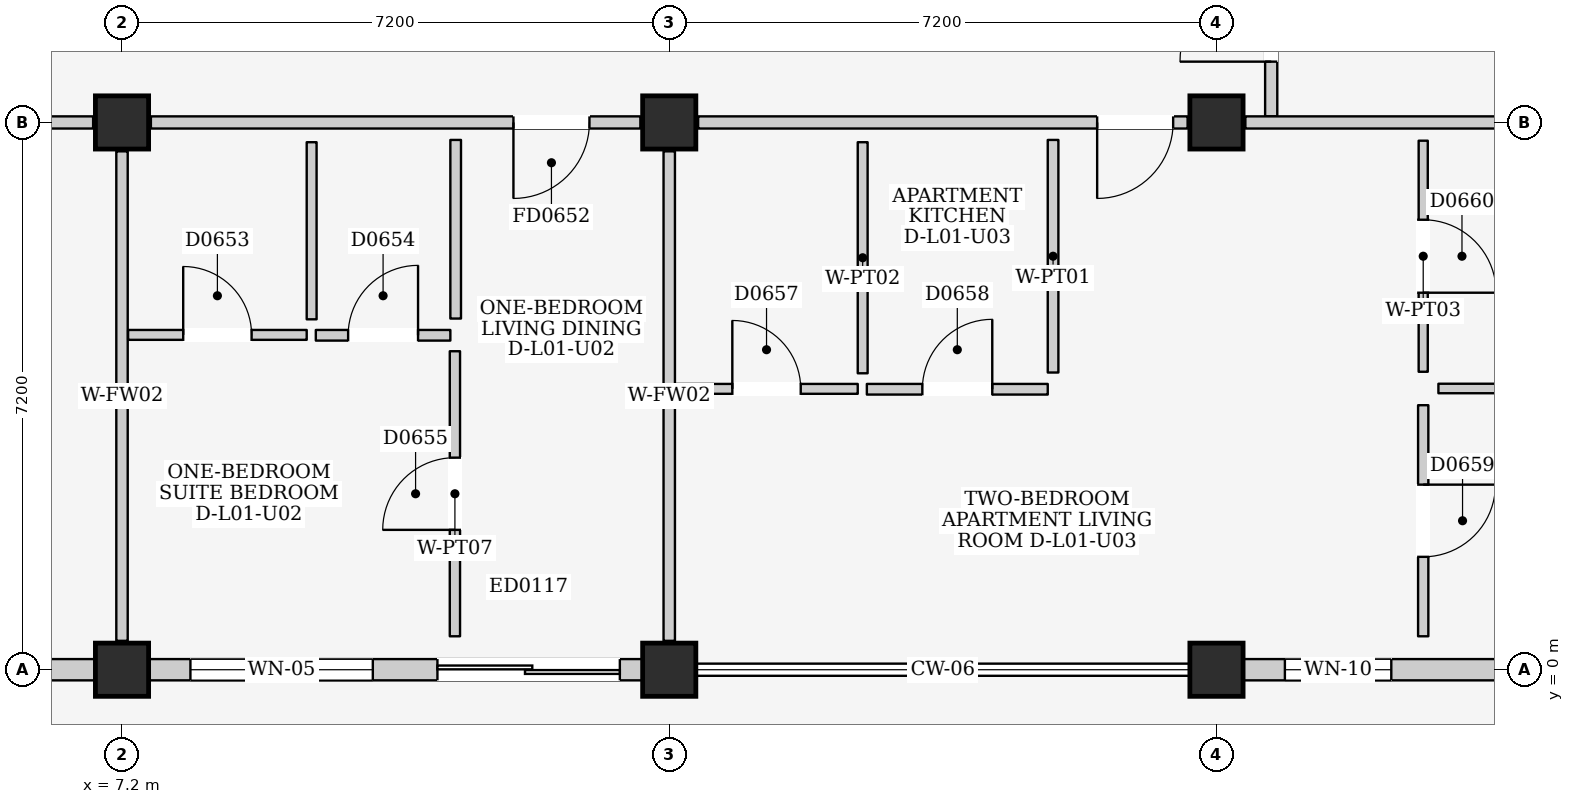
"""IFC4 building model, lengths in metres.
Left out: names, types, materials, properties, quantities, classifications, styles, units other than length and angle.
Written with IfcOpenShell. Run it as: python <this file> out.ifc"""

import sys

from ifc_helpers import new_model, si_unit, direction, frame, frame_2d, origin, origin_2d, place, context, subcontext, project, spatial, rectangle, extrude, element, fill, save


model = new_model("IFC4")
c1 = context("Model", 3, precision=1e-05, world=origin(), true_north=direction((0.0, 1.0)))
c2 = subcontext(c1, "Body", "Model", "MODEL_VIEW")
j1 = project(units=[si_unit("LENGTHUNIT", "METRE"), si_unit("PLANEANGLEUNIT", "RADIAN")], contexts=[c1])
p1 = place(None, origin())
s1 = spatial("IfcSite", under=j1, at=p1, CompositionType="ELEMENT")
p2 = place(p1, origin())
s2 = spatial("IfcBuilding", under=s1, at=p2, CompositionType="ELEMENT")
p3 = place(p2, frame((0.0, 0.0, 4.5)))
s3 = spatial("IfcBuildingStorey", under=s2, at=p3, CompositionType="ELEMENT", Elevation=4.5)
for number, where, z_axis, x_axis in (
    (1, (7.2, 0.0, 0.0), (0.0, 0.0, 1.0), (1.0, 0.0, 0.0)),
    (2, (7.2, 7.2, 0.0), (0.0, 0.0, 1.0), (1.0, 0.0, 0.0)),
    (3, (14.4, 0.0, 0.0), (0.0, 0.0, 1.0), (1.0, 0.0, 0.0)),
    (4, (14.4, 7.2, 0.0), (0.0, 0.0, 1.0), (1.0, 0.0, 0.0)),
    (5, (21.6, 0.0, 0.0), (0.0, 0.0, 1.0), (1.0, 0.0, 0.0)),
    (6, (21.6, 7.2, 0.0), (0.0, 0.0, 1.0), (1.0, 0.0, 0.0)),
):
    element("IfcColumn", number, at=place(p3, frame(where, z_axis=z_axis, x_axis=x_axis)), inside=s3, PredefinedType="COLUMN", context=c2, shape_type="SweptSolid", body=[
        extrude(rectangle(XDim=0.7, YDim=0.7, at=origin_2d()), origin(), (0.0, 0.0, 1.0), 4.5),
    ])
p4 = place(p3, frame((0.35, 0.0, 0.0), z_axis=(0.0, 0.0, 1.0), x_axis=(1.0, 0.0, 0.0)))
e7 = element("IfcWall", 7, at=p4, inside=s3, PredefinedType="ELEMENTEDWALL", context=c2, shape_type="SweptSolid", body=[
    extrude(rectangle(XDim=6.5, YDim=0.28, at=frame_2d((3.25, 0.0))), origin(), (0.0, 0.0, 1.0), 3.715),
])
p5 = place(p4, frame((3.85, 0.0, 0.0)))
e8 = element("IfcOpeningElement", 8, at=p5, cuts=e7, PredefinedType="OPENING", context=c2, shape_type="SweptSolid", body=[
    extrude(rectangle(XDim=1.5, YDim=2.12, at=frame_2d((0.75, 1.06))), frame((0.0, 0.155, 0.0), z_axis=(0.0, -1.0, 0.0), x_axis=(1.0, 0.0, 0.0)), (0.0, 0.0, 1.0), 0.31),
])
p6 = place(p4, frame((0.55, 0.0, 0.9)))
e9 = element("IfcOpeningElement", 9, at=p6, cuts=e7, PredefinedType="OPENING", context=c2, shape_type="SweptSolid", body=[
    extrude(rectangle(XDim=0.9, YDim=1.1, at=frame_2d((0.45, 0.55))), frame((0.0, 0.155, 0.0), z_axis=(0.0, -1.0, 0.0), x_axis=(1.0, 0.0, 0.0)), (0.0, 0.0, 1.0), 0.31),
])
p7 = place(p3, frame((7.55, 0.0, 0.0), z_axis=(0.0, 0.0, 1.0), x_axis=(1.0, 0.0, 0.0)))
e10 = element("IfcWall", 10, at=p7, inside=s3, PredefinedType="ELEMENTEDWALL", context=c2, shape_type="SweptSolid", body=[
    extrude(rectangle(XDim=6.5, YDim=0.28, at=frame_2d((3.25, 0.0))), origin(), (0.0, 0.0, 1.0), 3.715),
])
p8 = place(p7, frame((3.8, 0.0, 0.0)))
e11 = element("IfcOpeningElement", 11, at=p8, cuts=e10, PredefinedType="OPENING", context=c2, shape_type="SweptSolid", body=[
    extrude(rectangle(XDim=2.4, YDim=2.12, at=frame_2d((1.2, 1.06))), frame((0.0, 0.155, 0.0), z_axis=(0.0, -1.0, 0.0), x_axis=(1.0, 0.0, 0.0)), (0.0, 0.0, 1.0), 0.31),
])
p9 = place(p7, frame((0.55, 0.0, 0.9)))
e12 = element("IfcOpeningElement", 12, at=p9, cuts=e10, PredefinedType="OPENING", context=c2, shape_type="SweptSolid", body=[
    extrude(rectangle(XDim=2.4, YDim=1.65, at=frame_2d((1.2, 0.825))), frame((0.0, 0.155, 0.0), z_axis=(0.0, -1.0, 0.0), x_axis=(1.0, 0.0, 0.0)), (0.0, 0.0, 1.0), 0.31),
])
p10 = place(p3, frame((21.95, 0.0, 0.0), z_axis=(0.0, 0.0, 1.0), x_axis=(1.0, 0.0, 0.0)))
e13 = element("IfcWall", 13, at=p10, inside=s3, PredefinedType="ELEMENTEDWALL", context=c2, shape_type="SweptSolid", body=[
    extrude(rectangle(XDim=6.5, YDim=0.28, at=frame_2d((3.25, 0.0))), origin(), (0.0, 0.0, 1.0), 3.715),
])
p11 = place(p10, frame((3.85, 0.0, 0.0)))
e14 = element("IfcOpeningElement", 14, at=p11, cuts=e13, PredefinedType="OPENING", context=c2, shape_type="SweptSolid", body=[
    extrude(rectangle(XDim=1.4, YDim=2.1, at=frame_2d((0.7, 1.05))), frame((0.0, 0.155, 0.0), z_axis=(0.0, -1.0, 0.0), x_axis=(1.0, 0.0, 0.0)), (0.0, 0.0, 1.0), 0.31),
])
p12 = place(p10, frame((0.55, 0.0, 0.9)))
e15 = element("IfcOpeningElement", 15, at=p12, cuts=e13, PredefinedType="OPENING", context=c2, shape_type="SweptSolid", body=[
    extrude(rectangle(XDim=1.4, YDim=1.2, at=frame_2d((0.7, 0.6))), frame((0.0, 0.155, 0.0), z_axis=(0.0, -1.0, 0.0), x_axis=(1.0, 0.0, 0.0)), (0.0, 0.0, 1.0), 0.31),
])
p13 = place(p3, frame((22.32, 7.28, 0.0), z_axis=(0.0, 0.0, 1.0), x_axis=(0.0, 1.0, 0.0)))
e16 = element("IfcWall", 16, at=p13, inside=s3, PredefinedType="PARTITIONING", context=c2, shape_type="SweptSolid", body=[
    extrude(rectangle(XDim=4.32, YDim=0.16, at=frame_2d((2.16, 0.0))), origin(), (0.0, 0.0, 1.0), 4.25),
])
p14 = place(p13, frame((0.72, 0.0, 0.0)))
e17 = element("IfcOpeningElement", 17, at=p14, cuts=e16, PredefinedType="OPENING", context=c2, shape_type="SweptSolid", body=[
    extrude(rectangle(XDim=1.2, YDim=2.2, at=frame_2d((0.6, 1.1))), frame((0.0, 0.095, 0.0), z_axis=(0.0, -1.0, 0.0), x_axis=(1.0, 0.0, 0.0)), (0.0, 0.0, 1.0), 0.19),
])
p15 = place(p3, frame((0.38, 7.2, 0.0), z_axis=(0.0, 0.0, 1.0), x_axis=(1.0, 0.0, 0.0)))
e18 = element("IfcWall", 18, at=p15, inside=s3, PredefinedType="PARTITIONING", context=c2, shape_type="SweptSolid", body=[
    extrude(rectangle(XDim=6.44, YDim=0.16, at=frame_2d((3.22, 0.0))), origin(), (0.0, 0.0, 1.0), 3.635),
])
p16 = place(p15, frame((4.045, 0.0, 0.0)))
e19 = element("IfcOpeningElement", 19, at=p16, cuts=e18, PredefinedType="OPENING", context=c2, shape_type="SweptSolid", body=[
    extrude(rectangle(XDim=1.05, YDim=2.2, at=frame_2d((0.525, 1.1))), frame((0.0, 0.095, 0.0), z_axis=(0.0, -1.0, 0.0), x_axis=(1.0, 0.0, 0.0)), (0.0, 0.0, 1.0), 0.19),
])
p17 = place(p3, frame((7.2, 0.38, 0.0), z_axis=(0.0, 0.0, 1.0), x_axis=(0.0, 1.0, 0.0)))
e20 = element("IfcWall", 20, at=p17, inside=s3, PredefinedType="PARTITIONING", context=c2, shape_type="SweptSolid", body=[
    extrude(rectangle(XDim=6.44, YDim=0.15, at=frame_2d((3.22, 0.0))), origin(), (0.0, 0.0, 1.0), 3.685),
])
p18 = place(p3, frame((7.58, 7.2, 0.0), z_axis=(0.0, 0.0, 1.0), x_axis=(1.0, 0.0, 0.0)))
e21 = element("IfcWall", 21, at=p18, inside=s3, PredefinedType="PARTITIONING", context=c2, shape_type="SweptSolid", body=[
    extrude(rectangle(XDim=6.44, YDim=0.16, at=frame_2d((3.22, 0.0))), origin(), (0.0, 0.0, 1.0), 3.635),
])
p19 = place(p18, frame((4.77, 0.0, 0.0)))
e22 = element("IfcOpeningElement", 22, at=p19, cuts=e21, PredefinedType="OPENING", context=c2, shape_type="SweptSolid", body=[
    extrude(rectangle(XDim=1.0, YDim=2.15, at=frame_2d((0.5, 1.075))), frame((0.0, 0.095, 0.0), z_axis=(0.0, -1.0, 0.0), x_axis=(1.0, 0.0, 0.0)), (0.0, 0.0, 1.0), 0.19),
])
p20 = place(p3, frame((14.4, 0.38, 0.0), z_axis=(0.0, 0.0, 1.0), x_axis=(0.0, 1.0, 0.0)))
e23 = element("IfcWall", 23, at=p20, inside=s3, PredefinedType="PARTITIONING", context=c2, shape_type="SweptSolid", body=[
    extrude(rectangle(XDim=6.44, YDim=0.15, at=frame_2d((3.22, 0.0))), origin(), (0.0, 0.0, 1.0), 3.685),
])
p21 = place(p3, frame((7.28, 4.405, 0.0), z_axis=(0.0, 0.0, 1.0), x_axis=(1.0, 0.0, 0.0)))
e24 = element("IfcWall", 24, at=p21, inside=s3, PredefinedType="PARTITIONING", context=c2, shape_type="SweptSolid", body=[
    extrude(rectangle(XDim=2.35, YDim=0.13, at=frame_2d((1.175, 0.0))), origin(), (0.0, 0.0, 1.0), 4.25),
])
p22 = place(p21, frame((0.725, 0.0, 0.0)))
e25 = element("IfcOpeningElement", 25, at=p22, cuts=e24, PredefinedType="OPENING", context=c2, shape_type="SweptSolid", body=[
    extrude(rectangle(XDim=0.9, YDim=2.1, at=frame_2d((0.45, 1.05))), frame((0.0, 0.08, 0.0), z_axis=(0.0, -1.0, 0.0), x_axis=(1.0, 0.0, 0.0)), (0.0, 0.0, 1.0), 0.16),
])
p23 = place(p3, frame((9.695, 4.61, 0.0), z_axis=(0.0, 0.0, 1.0), x_axis=(0.0, 1.0, 0.0)))
e26 = element("IfcWall", 26, at=p23, inside=s3, PredefinedType="PARTITIONING", context=c2, shape_type="SweptSolid", body=[
    extrude(rectangle(XDim=2.33, YDim=0.13, at=frame_2d((1.165, 0.0))), origin(), (0.0, 0.0, 1.0), 4.25),
])
p24 = place(p3, frame((9.75, 4.4, 0.0), z_axis=(0.0, 0.0, 1.0), x_axis=(1.0, 0.0, 0.0)))
e27 = element("IfcWall", 27, at=p24, inside=s3, PredefinedType="PARTITIONING", context=c2, shape_type="SweptSolid", body=[
    extrude(rectangle(XDim=1.77, YDim=0.14, at=frame_2d((0.885, 0.0))), origin(), (0.0, 0.0, 1.0), 4.25),
])
p25 = place(p24, frame((0.425, 0.0, 0.0)))
e28 = element("IfcOpeningElement", 28, at=p25, cuts=e27, PredefinedType="OPENING", context=c2, shape_type="SweptSolid", body=[
    extrude(rectangle(XDim=0.92, YDim=2.1, at=frame_2d((0.46, 1.05))), frame((0.0, 0.085, 0.0), z_axis=(0.0, -1.0, 0.0), x_axis=(1.0, 0.0, 0.0)), (0.0, 0.0, 1.0), 0.17),
])
p26 = place(p3, frame((11.59, 4.62, 0.0), z_axis=(0.0, 0.0, 1.0), x_axis=(0.0, 1.0, 0.0)))
e29 = element("IfcWall", 29, at=p26, inside=s3, PredefinedType="PARTITIONING", context=c2, shape_type="SweptSolid", body=[
    extrude(rectangle(XDim=2.35, YDim=0.14, at=frame_2d((1.175, 0.0))), origin(), (0.0, 0.0, 1.0), 4.25),
])
p27 = place(p3, frame((11.58, 0.44, 0.0), z_axis=(0.0, 0.0, 1.0), x_axis=(0.0, 1.0, 0.0)))
e30 = element("IfcWall", 30, at=p27, inside=s3, PredefinedType="PARTITIONING", context=c2, shape_type="SweptSolid", body=[
    extrude(rectangle(XDim=3.75, YDim=0.135, at=frame_2d((1.875, 0.0))), origin(), (0.0, 0.0, 1.0), 4.25),
])
p28 = place(p27, frame((1.4, 0.0, 0.0)))
e31 = element("IfcOpeningElement", 31, at=p28, cuts=e30, PredefinedType="OPENING", context=c2, shape_type="SweptSolid", body=[
    extrude(rectangle(XDim=0.95, YDim=2.15, at=frame_2d((0.475, 1.075))), frame((0.0, 0.083, 0.0), z_axis=(0.0, -1.0, 0.0), x_axis=(1.0, 0.0, 0.0)), (0.0, 0.0, 1.0), 0.165),
])
p29 = place(p3, frame((14.78, 7.2, 0.0), z_axis=(0.0, 0.0, 1.0), x_axis=(1.0, 0.0, 0.0)))
e32 = element("IfcWall", 32, at=p29, inside=s3, PredefinedType="PARTITIONING", context=c2, shape_type="SweptSolid", body=[
    extrude(rectangle(XDim=6.44, YDim=0.16, at=frame_2d((3.22, 0.0))), origin(), (0.0, 0.0, 1.0), 3.635),
])
p30 = place(p29, frame((5.25, 0.0, 0.0)))
e33 = element("IfcOpeningElement", 33, at=p30, cuts=e32, PredefinedType="OPENING", context=c2, shape_type="SweptSolid", body=[
    extrude(rectangle(XDim=1.0, YDim=2.15, at=frame_2d((0.5, 1.075))), frame((0.0, 0.095, 0.0), z_axis=(0.0, -1.0, 0.0), x_axis=(1.0, 0.0, 0.0)), (0.0, 0.0, 1.0), 0.19),
])
p31 = place(p3, frame((21.98, 7.2, 0.0), z_axis=(0.0, 0.0, 1.0), x_axis=(1.0, 0.0, 0.0)))
e34 = element("IfcWall", 34, at=p31, inside=s3, PredefinedType="PARTITIONING", context=c2, shape_type="SweptSolid", body=[
    extrude(rectangle(XDim=6.44, YDim=0.16, at=frame_2d((3.22, 0.0))), origin(), (0.0, 0.0, 1.0), 3.635),
])
p32 = place(p3, frame((14.48, 3.695, 0.0), z_axis=(0.0, 0.0, 1.0), x_axis=(1.0, 0.0, 0.0)))
e35 = element("IfcWall", 35, at=p32, inside=s3, PredefinedType="PARTITIONING", context=c2, shape_type="SweptSolid", body=[
    extrude(rectangle(XDim=2.4, YDim=0.13, at=frame_2d((1.2, 0.0))), origin(), (0.0, 0.0, 1.0), 4.25),
])
p33 = place(p32, frame((0.75, 0.0, 0.0)))
e36 = element("IfcOpeningElement", 36, at=p33, cuts=e35, PredefinedType="OPENING", context=c2, shape_type="SweptSolid", body=[
    extrude(rectangle(XDim=0.9, YDim=2.1, at=frame_2d((0.45, 1.05))), frame((0.0, 0.08, 0.0), z_axis=(0.0, -1.0, 0.0), x_axis=(1.0, 0.0, 0.0)), (0.0, 0.0, 1.0), 0.16),
])
p34 = place(p3, frame((16.945, 3.9, 0.0), z_axis=(0.0, 0.0, 1.0), x_axis=(0.0, 1.0, 0.0)))
e37 = element("IfcWall", 37, at=p34, inside=s3, PredefinedType="PARTITIONING", context=c2, shape_type="SweptSolid", body=[
    extrude(rectangle(XDim=3.04, YDim=0.13, at=frame_2d((1.52, 0.0))), origin(), (0.0, 0.0, 1.0), 4.25),
])
p35 = place(p3, frame((17.0, 3.69, 0.0), z_axis=(0.0, 0.0, 1.0), x_axis=(1.0, 0.0, 0.0)))
e38 = element("IfcWall", 38, at=p35, inside=s3, PredefinedType="PARTITIONING", context=c2, shape_type="SweptSolid", body=[
    extrude(rectangle(XDim=2.38, YDim=0.14, at=frame_2d((1.19, 0.0))), origin(), (0.0, 0.0, 1.0), 4.25),
])
p36 = place(p35, frame((0.73, 0.0, 0.0)))
e39 = element("IfcOpeningElement", 39, at=p36, cuts=e38, PredefinedType="OPENING", context=c2, shape_type="SweptSolid", body=[
    extrude(rectangle(XDim=0.92, YDim=2.1, at=frame_2d((0.46, 1.05))), frame((0.0, 0.085, 0.0), z_axis=(0.0, -1.0, 0.0), x_axis=(1.0, 0.0, 0.0)), (0.0, 0.0, 1.0), 0.17),
])
p37 = place(p3, frame((19.45, 3.91, 0.0), z_axis=(0.0, 0.0, 1.0), x_axis=(0.0, 1.0, 0.0)))
e40 = element("IfcWall", 40, at=p37, inside=s3, PredefinedType="PARTITIONING", context=c2, shape_type="SweptSolid", body=[
    extrude(rectangle(XDim=3.06, YDim=0.14, at=frame_2d((1.53, 0.0))), origin(), (0.0, 0.0, 1.0), 4.25),
])
p38 = place(p3, frame((24.32, 0.44, 0.0), z_axis=(0.0, 0.0, 1.0), x_axis=(0.0, 1.0, 0.0)))
e41 = element("IfcWall", 41, at=p38, inside=s3, PredefinedType="PARTITIONING", context=c2, shape_type="SweptSolid", body=[
    extrude(rectangle(XDim=3.04, YDim=0.135, at=frame_2d((1.52, 0.0))), origin(), (0.0, 0.0, 1.0), 4.25),
])
p39 = place(p38, frame((1.045, 0.0, 0.0)))
e42 = element("IfcOpeningElement", 42, at=p39, cuts=e41, PredefinedType="OPENING", context=c2, shape_type="SweptSolid", body=[
    extrude(rectangle(XDim=0.95, YDim=2.15, at=frame_2d((0.475, 1.075))), frame((0.0, 0.083, 0.0), z_axis=(0.0, -1.0, 0.0), x_axis=(1.0, 0.0, 0.0)), (0.0, 0.0, 1.0), 0.165),
])
p40 = place(p3, frame((24.52, 3.7, 0.0), z_axis=(0.0, 0.0, 1.0), x_axis=(1.0, 0.0, 0.0)))
e43 = element("IfcWall", 43, at=p40, inside=s3, PredefinedType="PARTITIONING", context=c2, shape_type="SweptSolid", body=[
    extrude(rectangle(XDim=4.06, YDim=0.125, at=frame_2d((2.03, 0.0))), origin(), (0.0, 0.0, 1.0), 4.25),
])
p41 = place(p3, frame((24.32, 3.92, 0.0), z_axis=(0.0, 0.0, 1.0), x_axis=(0.0, 1.0, 0.0)))
e44 = element("IfcWall", 44, at=p41, inside=s3, PredefinedType="PARTITIONING", context=c2, shape_type="SweptSolid", body=[
    extrude(rectangle(XDim=3.04, YDim=0.12, at=frame_2d((1.52, 0.0))), origin(), (0.0, 0.0, 1.0), 4.25),
])
p42 = place(p41, frame((1.04, 0.0, 0.0)))
e45 = element("IfcOpeningElement", 45, at=p42, cuts=e44, PredefinedType="OPENING", context=c2, shape_type="SweptSolid", body=[
    extrude(rectangle(XDim=0.96, YDim=2.15, at=frame_2d((0.48, 1.075))), frame((0.0, 0.075, 0.0), z_axis=(0.0, -1.0, 0.0), x_axis=(1.0, 0.0, 0.0)), (0.0, 0.0, 1.0), 0.15),
])
p43 = place(p8, frame((2.4, 0.0, 0.0), z_axis=(0.0, 0.0, 1.0), x_axis=(-1.0, 0.0, 0.0)))
e46 = element("IfcDoor", 46, at=p43, inside=s3, OperationType="DOUBLE_DOOR_SLIDING", PredefinedType="DOOR", context=c2, shape_type="SweptSolid", body=[
    extrude(rectangle(XDim=2.4, YDim=2.12, at=frame_2d((1.2, 1.06))), frame((0.0, 0.025, 0.0), z_axis=(0.0, -1.0, 0.0), x_axis=(1.0, 0.0, 0.0)), (0.0, 0.0, 1.0), 0.05),
])
fill(e11, e46)
p44 = place(p9, origin())
e47 = element("IfcWindow", 47, at=p44, inside=s3, PartitioningType="TRIPLE_PANEL_VERTICAL", PredefinedType="WINDOW", context=c2, shape_type="SweptSolid", body=[
    extrude(rectangle(XDim=2.4, YDim=1.65, at=frame_2d((1.2, 0.825))), frame((0.0, 0.03, 0.0), z_axis=(0.0, -1.0, 0.0), x_axis=(1.0, 0.0, 0.0)), (0.0, 0.0, 1.0), 0.06),
])
fill(e12, e47)
p45 = place(p12, origin())
e48 = element("IfcWindow", 48, at=p45, inside=s3, PartitioningType="DOUBLE_PANEL_HORIZONTAL", PredefinedType="WINDOW", context=c2, shape_type="SweptSolid", body=[
    extrude(rectangle(XDim=1.4, YDim=1.2, at=frame_2d((0.7, 0.6))), frame((0.0, 0.03, 0.0), z_axis=(0.0, -1.0, 0.0), x_axis=(1.0, 0.0, 0.0)), (0.0, 0.0, 1.0), 0.06),
])
fill(e15, e48)
p46 = place(p14, origin())
e49 = element("IfcDoor", 49, at=p46, inside=s3, OperationType="SINGLE_SWING_LEFT", PredefinedType="DOOR", context=c2, shape_type="SweptSolid", body=[
    extrude(rectangle(XDim=1.2, YDim=2.2, at=frame_2d((0.6, 1.1))), frame((0.0, 0.025, 0.0), z_axis=(0.0, -1.0, 0.0), x_axis=(1.0, 0.0, 0.0)), (0.0, 0.0, 1.0), 0.05),
])
fill(e17, e49)
p47 = place(p19, frame((1.0, 0.0, 0.0), z_axis=(0.0, 0.0, 1.0), x_axis=(-1.0, 0.0, 0.0)))
e50 = element("IfcDoor", 50, at=p47, inside=s3, OperationType="SINGLE_SWING_RIGHT", PredefinedType="DOOR", context=c2, shape_type="SweptSolid", body=[
    extrude(rectangle(XDim=1.0, YDim=2.15, at=frame_2d((0.5, 1.075))), frame((0.0, 0.025, 0.0), z_axis=(0.0, -1.0, 0.0), x_axis=(1.0, 0.0, 0.0)), (0.0, 0.0, 1.0), 0.05),
])
fill(e22, e50)
p48 = place(p22, origin())
e51 = element("IfcDoor", 51, at=p48, inside=s3, OperationType="SINGLE_SWING_LEFT", PredefinedType="DOOR", context=c2, shape_type="SweptSolid", body=[
    extrude(rectangle(XDim=0.9, YDim=2.1, at=frame_2d((0.45, 1.05))), frame((0.0, 0.025, 0.0), z_axis=(0.0, -1.0, 0.0), x_axis=(1.0, 0.0, 0.0)), (0.0, 0.0, 1.0), 0.05),
])
fill(e25, e51)
p49 = place(p25, origin())
e52 = element("IfcDoor", 52, at=p49, inside=s3, OperationType="SINGLE_SWING_RIGHT", PredefinedType="DOOR", context=c2, shape_type="SweptSolid", body=[
    extrude(rectangle(XDim=0.92, YDim=2.1, at=frame_2d((0.46, 1.05))), frame((0.0, 0.025, 0.0), z_axis=(0.0, -1.0, 0.0), x_axis=(1.0, 0.0, 0.0)), (0.0, 0.0, 1.0), 0.05),
])
fill(e28, e52)
p50 = place(p28, origin())
e53 = element("IfcDoor", 53, at=p50, inside=s3, OperationType="SINGLE_SWING_LEFT", PredefinedType="DOOR", context=c2, shape_type="SweptSolid", body=[
    extrude(rectangle(XDim=0.95, YDim=2.15, at=frame_2d((0.475, 1.075))), frame((0.0, 0.025, 0.0), z_axis=(0.0, -1.0, 0.0), x_axis=(1.0, 0.0, 0.0)), (0.0, 0.0, 1.0), 0.05),
])
fill(e31, e53)
p51 = place(p30, frame((1.0, 0.0, 0.0), z_axis=(0.0, 0.0, 1.0), x_axis=(-1.0, 0.0, 0.0)))
e54 = element("IfcDoor", 54, at=p51, inside=s3, OperationType="SINGLE_SWING_RIGHT", PredefinedType="DOOR", context=c2, shape_type="SweptSolid", body=[
    extrude(rectangle(XDim=1.0, YDim=2.15, at=frame_2d((0.5, 1.075))), frame((0.0, 0.025, 0.0), z_axis=(0.0, -1.0, 0.0), x_axis=(1.0, 0.0, 0.0)), (0.0, 0.0, 1.0), 0.05),
])
fill(e33, e54)
p52 = place(p33, origin())
e55 = element("IfcDoor", 55, at=p52, inside=s3, OperationType="SINGLE_SWING_LEFT", PredefinedType="DOOR", context=c2, shape_type="SweptSolid", body=[
    extrude(rectangle(XDim=0.9, YDim=2.1, at=frame_2d((0.45, 1.05))), frame((0.0, 0.025, 0.0), z_axis=(0.0, -1.0, 0.0), x_axis=(1.0, 0.0, 0.0)), (0.0, 0.0, 1.0), 0.05),
])
fill(e36, e55)
p53 = place(p36, origin())
e56 = element("IfcDoor", 56, at=p53, inside=s3, OperationType="SINGLE_SWING_RIGHT", PredefinedType="DOOR", context=c2, shape_type="SweptSolid", body=[
    extrude(rectangle(XDim=0.92, YDim=2.1, at=frame_2d((0.46, 1.05))), frame((0.0, 0.025, 0.0), z_axis=(0.0, -1.0, 0.0), x_axis=(1.0, 0.0, 0.0)), (0.0, 0.0, 1.0), 0.05),
])
fill(e39, e56)
p54 = place(p39, frame((0.95, 0.0, 0.0), z_axis=(0.0, 0.0, 1.0), x_axis=(-1.0, 0.0, 0.0)))
e57 = element("IfcDoor", 57, at=p54, inside=s3, OperationType="SINGLE_SWING_LEFT", PredefinedType="DOOR", context=c2, shape_type="SweptSolid", body=[
    extrude(rectangle(XDim=0.95, YDim=2.15, at=frame_2d((0.475, 1.075))), frame((0.0, 0.025, 0.0), z_axis=(0.0, -1.0, 0.0), x_axis=(1.0, 0.0, 0.0)), (0.0, 0.0, 1.0), 0.05),
])
fill(e42, e57)
p55 = place(p42, frame((0.96, 0.0, 0.0), z_axis=(0.0, 0.0, 1.0), x_axis=(-1.0, 0.0, 0.0)))
e58 = element("IfcDoor", 58, at=p55, inside=s3, OperationType="SINGLE_SWING_RIGHT", PredefinedType="DOOR", context=c2, shape_type="SweptSolid", body=[
    extrude(rectangle(XDim=0.96, YDim=2.15, at=frame_2d((0.48, 1.075))), frame((0.0, 0.025, 0.0), z_axis=(0.0, -1.0, 0.0), x_axis=(1.0, 0.0, 0.0)), (0.0, 0.0, 1.0), 0.05),
])
fill(e45, e58)
save(model, sys.argv[1])
